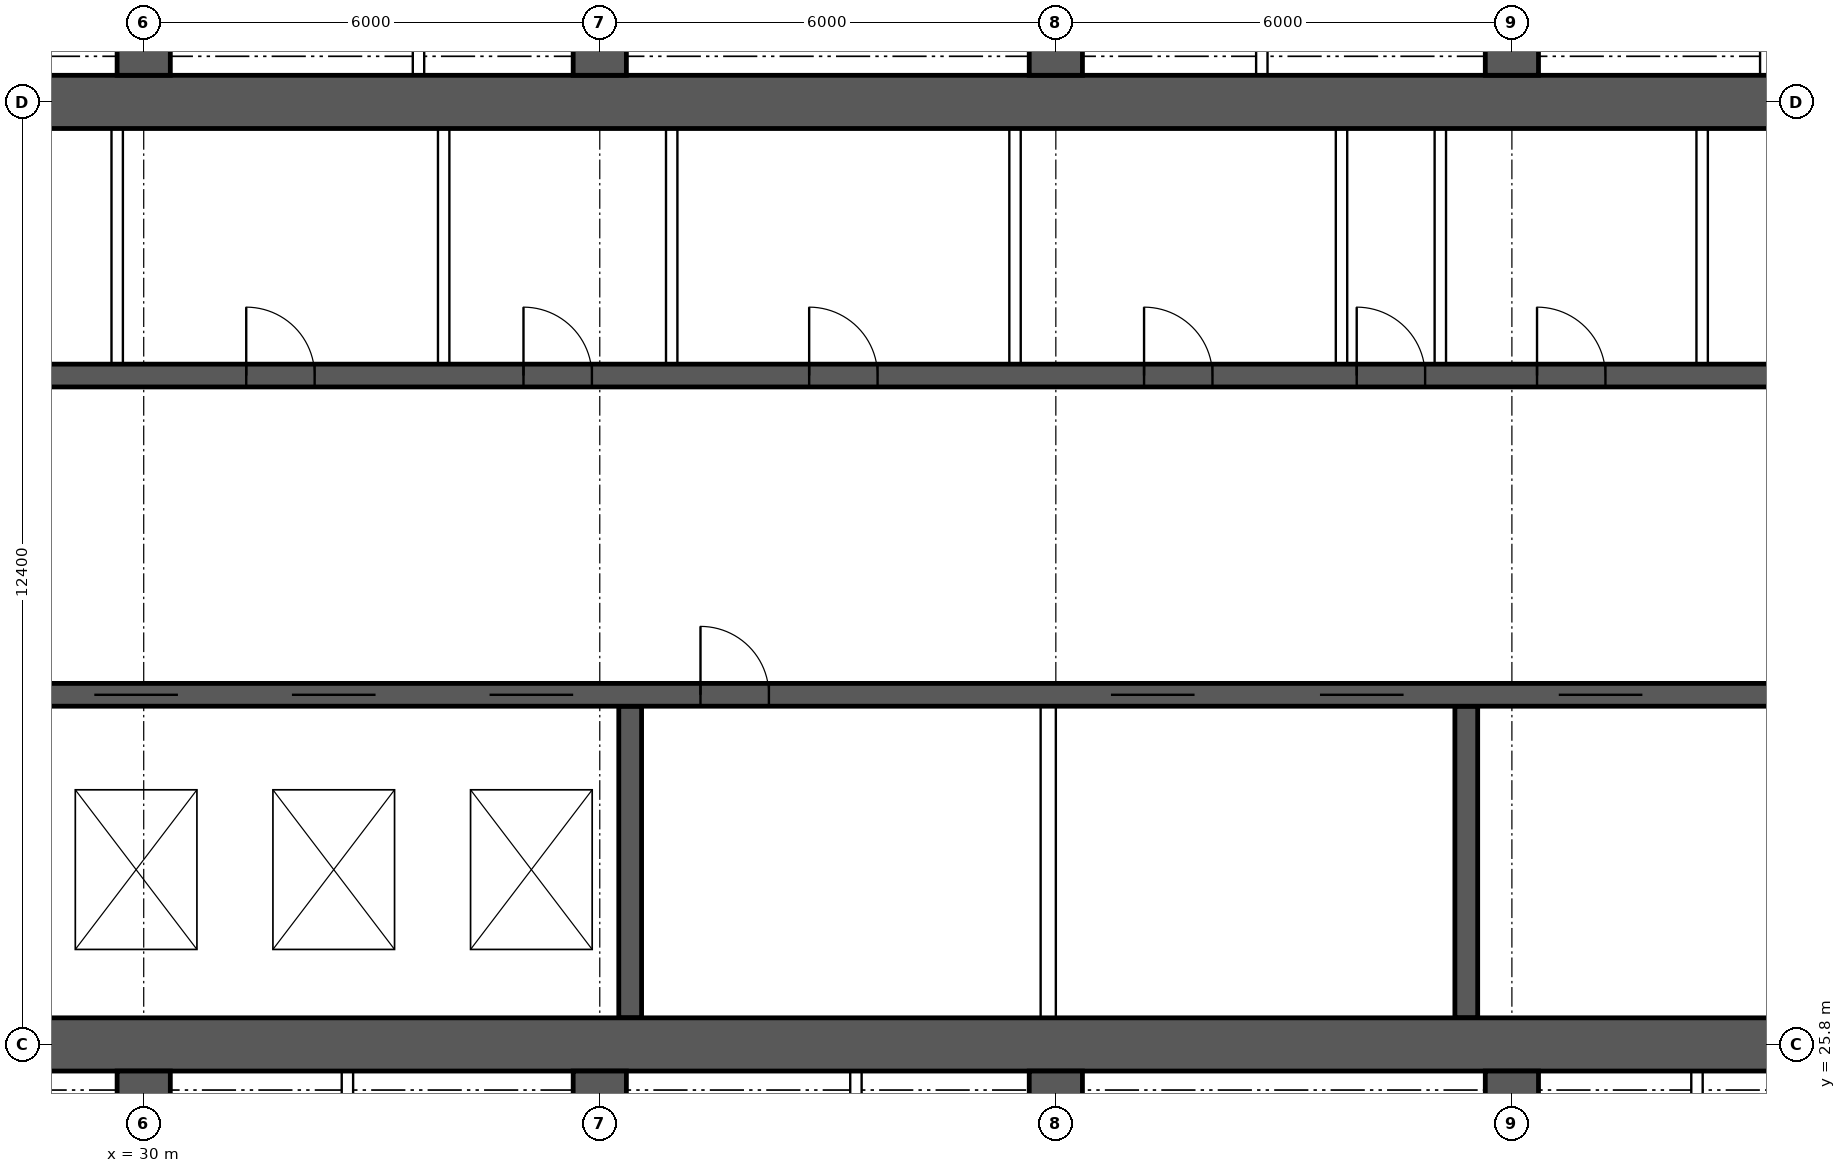
"""IFC4 building model, lengths in metres.
Left out: names, types, materials, properties, quantities, classifications, styles, units other than length and angle.
Written with IfcOpenShell. Run it as: python <this file> out.ifc"""

import sys

from ifc_helpers import new_model, si_unit, direction, frame, frame_2d, origin, place, context, subcontext, project, spatial, rectangle, extrude, element, fill, save


model = new_model("IFC4")
c1 = context("Model", 3, precision=1e-05, world=origin(), true_north=direction((0.0, 1.0)))
c2 = subcontext(c1, "Body", "Model", "MODEL_VIEW")
j1 = project(units=[si_unit("LENGTHUNIT", "METRE"), si_unit("PLANEANGLEUNIT", "RADIAN")], contexts=[c1])
p1 = place(None, origin())
s1 = spatial("IfcSite", under=j1, at=p1, CompositionType="ELEMENT")
p2 = place(p1, origin())
s2 = spatial("IfcBuilding", under=s1, at=p2, CompositionType="ELEMENT")
p3 = place(p2, frame((0.0, 0.0, 208.3)))
s3 = spatial("IfcBuildingStorey", under=s2, at=p3, CompositionType="ELEMENT", Elevation=208.3)
for number, where, z_axis, x_axis in (
    (1, (18.0, 25.8, 0.0), (0.0, 0.0, 1.0), (1.0, 0.0, 0.0)),
    (2, (18.0, 38.2, 0.0), (0.0, 0.0, 1.0), (1.0, 0.0, 0.0)),
):
    element("IfcWall", number, at=place(p3, frame(where, z_axis=z_axis, x_axis=x_axis)), inside=s3, PredefinedType="SHEAR", context=c2, shape_type="SweptSolid", body=[
        extrude(rectangle(XDim=48.0, YDim=0.7, at=frame_2d((24.0, 0.0))), origin(), (0.0, 0.0, 1.0), 4.5),
    ])
p4 = place(p3, frame((18.35, 30.4, 0.0), z_axis=(0.0, 0.0, 1.0), x_axis=(1.0, 0.0, 0.0)))
e3 = element("IfcWall", 3, at=p4, inside=s3, PredefinedType="SHEAR", context=c2, shape_type="SweptSolid", body=[
    extrude(rectangle(XDim=47.3, YDim=0.3, at=frame_2d((23.65, 0.0))), origin(), (0.0, 0.0, 1.0), 4.5),
])
p5 = place(p4, frame((0.4, 0.0, 0.0)))
e4 = element("IfcOpeningElement", 4, at=p5, cuts=e3, PredefinedType="OPENING", context=c2, shape_type="SweptSolid", body=[
    extrude(rectangle(XDim=1.0, YDim=2.1, at=frame_2d((0.5, 1.05))), frame((0.0, 0.16, 0.0), z_axis=(0.0, -1.0, 0.0), x_axis=(1.0, 0.0, 0.0)), (0.0, 0.0, 1.0), 0.32),
])
p6 = place(p4, frame((45.9, 0.0, 0.0)))
e5 = element("IfcOpeningElement", 5, at=p6, cuts=e3, PredefinedType="OPENING", context=c2, shape_type="SweptSolid", body=[
    extrude(rectangle(XDim=1.0, YDim=2.1, at=frame_2d((0.5, 1.05))), frame((0.0, 0.16, 0.0), z_axis=(0.0, -1.0, 0.0), x_axis=(1.0, 0.0, 0.0)), (0.0, 0.0, 1.0), 0.32),
])
p7 = place(p4, frame((8.4, 0.0, 0.0)))
e6 = element("IfcOpeningElement", 6, at=p7, cuts=e3, PredefinedType="OPENING", context=c2, shape_type="SweptSolid", body=[
    extrude(rectangle(XDim=1.1, YDim=2.1, at=frame_2d((0.55, 1.05))), frame((0.0, 0.16, 0.0), z_axis=(0.0, -1.0, 0.0), x_axis=(1.0, 0.0, 0.0)), (0.0, 0.0, 1.0), 0.32),
])
p8 = place(p4, frame((11.0, 0.0, 0.0)))
e7 = element("IfcOpeningElement", 7, at=p8, cuts=e3, PredefinedType="OPENING", context=c2, shape_type="SweptSolid", body=[
    extrude(rectangle(XDim=1.1, YDim=2.1, at=frame_2d((0.55, 1.05))), frame((0.0, 0.16, 0.0), z_axis=(0.0, -1.0, 0.0), x_axis=(1.0, 0.0, 0.0)), (0.0, 0.0, 1.0), 0.32),
])
p9 = place(p4, frame((13.6, 0.0, 0.0)))
e8 = element("IfcOpeningElement", 8, at=p9, cuts=e3, PredefinedType="OPENING", context=c2, shape_type="SweptSolid", body=[
    extrude(rectangle(XDim=1.1, YDim=2.1, at=frame_2d((0.55, 1.05))), frame((0.0, 0.16, 0.0), z_axis=(0.0, -1.0, 0.0), x_axis=(1.0, 0.0, 0.0)), (0.0, 0.0, 1.0), 0.32),
])
p10 = place(p4, frame((16.2, 0.0, 0.0)))
e9 = element("IfcOpeningElement", 9, at=p10, cuts=e3, PredefinedType="OPENING", context=c2, shape_type="SweptSolid", body=[
    extrude(rectangle(XDim=1.1, YDim=2.1, at=frame_2d((0.55, 1.05))), frame((0.0, 0.16, 0.0), z_axis=(0.0, -1.0, 0.0), x_axis=(1.0, 0.0, 0.0)), (0.0, 0.0, 1.0), 0.32),
])
p11 = place(p4, frame((18.975, 0.0, 0.0)))
e10 = element("IfcOpeningElement", 10, at=p11, cuts=e3, PredefinedType="OPENING", context=c2, shape_type="SweptSolid", body=[
    extrude(rectangle(XDim=0.9, YDim=2.1, at=frame_2d((0.45, 1.05))), frame((0.0, 0.16, 0.0), z_axis=(0.0, -1.0, 0.0), x_axis=(1.0, 0.0, 0.0)), (0.0, 0.0, 1.0), 0.32),
])
p12 = place(p4, frame((24.375, 0.0, 0.0)))
e11 = element("IfcOpeningElement", 11, at=p12, cuts=e3, PredefinedType="OPENING", context=c2, shape_type="SweptSolid", body=[
    extrude(rectangle(XDim=1.1, YDim=2.1, at=frame_2d((0.55, 1.05))), frame((0.0, 0.16, 0.0), z_axis=(0.0, -1.0, 0.0), x_axis=(1.0, 0.0, 0.0)), (0.0, 0.0, 1.0), 0.32),
])
p13 = place(p4, frame((27.125, 0.0, 0.0)))
e12 = element("IfcOpeningElement", 12, at=p13, cuts=e3, PredefinedType="OPENING", context=c2, shape_type="SweptSolid", body=[
    extrude(rectangle(XDim=1.1, YDim=2.1, at=frame_2d((0.55, 1.05))), frame((0.0, 0.16, 0.0), z_axis=(0.0, -1.0, 0.0), x_axis=(1.0, 0.0, 0.0)), (0.0, 0.0, 1.0), 0.32),
])
p14 = place(p4, frame((30.267, 0.0, 0.0)))
e13 = element("IfcOpeningElement", 13, at=p14, cuts=e3, PredefinedType="OPENING", context=c2, shape_type="SweptSolid", body=[
    extrude(rectangle(XDim=1.1, YDim=2.1, at=frame_2d((0.55, 1.05))), frame((0.0, 0.16, 0.0), z_axis=(0.0, -1.0, 0.0), x_axis=(1.0, 0.0, 0.0)), (0.0, 0.0, 1.0), 0.32),
])
p15 = place(p4, frame((33.8, 0.0, 0.0)))
e14 = element("IfcOpeningElement", 14, at=p15, cuts=e3, PredefinedType="OPENING", context=c2, shape_type="SweptSolid", body=[
    extrude(rectangle(XDim=1.1, YDim=2.1, at=frame_2d((0.55, 1.05))), frame((0.0, 0.16, 0.0), z_axis=(0.0, -1.0, 0.0), x_axis=(1.0, 0.0, 0.0)), (0.0, 0.0, 1.0), 0.32),
])
p16 = place(p4, frame((37.333, 0.0, 0.0)))
e15 = element("IfcOpeningElement", 15, at=p16, cuts=e3, PredefinedType="OPENING", context=c2, shape_type="SweptSolid", body=[
    extrude(rectangle(XDim=1.1, YDim=2.1, at=frame_2d((0.55, 1.05))), frame((0.0, 0.16, 0.0), z_axis=(0.0, -1.0, 0.0), x_axis=(1.0, 0.0, 0.0)), (0.0, 0.0, 1.0), 0.32),
])
p17 = place(p3, frame((18.35, 34.6, 0.0), z_axis=(0.0, 0.0, 1.0), x_axis=(1.0, 0.0, 0.0)))
e16 = element("IfcWall", 16, at=p17, inside=s3, PredefinedType="SHEAR", context=c2, shape_type="SweptSolid", body=[
    extrude(rectangle(XDim=47.3, YDim=0.3, at=frame_2d((23.65, 0.0))), origin(), (0.0, 0.0, 1.0), 4.5),
])
p18 = place(p17, frame((0.9, 0.0, 0.0)))
e17 = element("IfcOpeningElement", 17, at=p18, cuts=e16, PredefinedType="OPENING", context=c2, shape_type="SweptSolid", body=[
    extrude(rectangle(XDim=1.1, YDim=2.1, at=frame_2d((0.55, 1.05))), frame((0.0, 0.16, 0.0), z_axis=(0.0, -1.0, 0.0), x_axis=(1.0, 0.0, 0.0)), (0.0, 0.0, 1.0), 0.32),
])
p19 = place(p17, frame((45.3, 0.0, 0.0)))
e18 = element("IfcOpeningElement", 18, at=p19, cuts=e16, PredefinedType="OPENING", context=c2, shape_type="SweptSolid", body=[
    extrude(rectangle(XDim=1.1, YDim=2.1, at=frame_2d((0.55, 1.05))), frame((0.0, 0.16, 0.0), z_axis=(0.0, -1.0, 0.0), x_axis=(1.0, 0.0, 0.0)), (0.0, 0.0, 1.0), 0.32),
])
p20 = place(p17, frame((4.25, 0.0, 0.0)))
e19 = element("IfcOpeningElement", 19, at=p20, cuts=e16, PredefinedType="OPENING", context=c2, shape_type="SweptSolid", body=[
    extrude(rectangle(XDim=0.9, YDim=2.1, at=frame_2d((0.45, 1.05))), frame((0.0, 0.16, 0.0), z_axis=(0.0, -1.0, 0.0), x_axis=(1.0, 0.0, 0.0)), (0.0, 0.0, 1.0), 0.32),
])
p21 = place(p17, frame((42.15, 0.0, 0.0)))
e20 = element("IfcOpeningElement", 20, at=p21, cuts=e16, PredefinedType="OPENING", context=c2, shape_type="SweptSolid", body=[
    extrude(rectangle(XDim=0.9, YDim=2.1, at=frame_2d((0.45, 1.05))), frame((0.0, 0.16, 0.0), z_axis=(0.0, -1.0, 0.0), x_axis=(1.0, 0.0, 0.0)), (0.0, 0.0, 1.0), 0.32),
])
p22 = place(p17, frame((9.025, 0.0, 0.0)))
e21 = element("IfcOpeningElement", 21, at=p22, cuts=e16, PredefinedType="OPENING", context=c2, shape_type="SweptSolid", body=[
    extrude(rectangle(XDim=0.9, YDim=2.1, at=frame_2d((0.45, 1.05))), frame((0.0, 0.16, 0.0), z_axis=(0.0, -1.0, 0.0), x_axis=(1.0, 0.0, 0.0)), (0.0, 0.0, 1.0), 0.32),
])
p23 = place(p17, frame((12.999, 0.0, 0.0)))
e22 = element("IfcOpeningElement", 22, at=p23, cuts=e16, PredefinedType="OPENING", context=c2, shape_type="SweptSolid", body=[
    extrude(rectangle(XDim=0.9, YDim=2.1, at=frame_2d((0.45, 1.05))), frame((0.0, 0.16, 0.0), z_axis=(0.0, -1.0, 0.0), x_axis=(1.0, 0.0, 0.0)), (0.0, 0.0, 1.0), 0.32),
])
p24 = place(p17, frame((16.646, 0.0, 0.0)))
e23 = element("IfcOpeningElement", 23, at=p24, cuts=e16, PredefinedType="OPENING", context=c2, shape_type="SweptSolid", body=[
    extrude(rectangle(XDim=0.9, YDim=2.1, at=frame_2d((0.45, 1.05))), frame((0.0, 0.16, 0.0), z_axis=(0.0, -1.0, 0.0), x_axis=(1.0, 0.0, 0.0)), (0.0, 0.0, 1.0), 0.32),
])
p25 = place(p17, frame((20.405, 0.0, 0.0)))
e24 = element("IfcOpeningElement", 24, at=p25, cuts=e16, PredefinedType="OPENING", context=c2, shape_type="SweptSolid", body=[
    extrude(rectangle(XDim=0.9, YDim=2.1, at=frame_2d((0.45, 1.05))), frame((0.0, 0.16, 0.0), z_axis=(0.0, -1.0, 0.0), x_axis=(1.0, 0.0, 0.0)), (0.0, 0.0, 1.0), 0.32),
])
p26 = place(p17, frame((24.811, 0.0, 0.0)))
e25 = element("IfcOpeningElement", 25, at=p26, cuts=e16, PredefinedType="OPENING", context=c2, shape_type="SweptSolid", body=[
    extrude(rectangle(XDim=0.9, YDim=2.1, at=frame_2d((0.45, 1.05))), frame((0.0, 0.16, 0.0), z_axis=(0.0, -1.0, 0.0), x_axis=(1.0, 0.0, 0.0)), (0.0, 0.0, 1.0), 0.32),
])
p27 = place(p17, frame((27.608, 0.0, 0.0)))
e26 = element("IfcOpeningElement", 26, at=p27, cuts=e16, PredefinedType="OPENING", context=c2, shape_type="SweptSolid", body=[
    extrude(rectangle(XDim=0.9, YDim=2.1, at=frame_2d((0.45, 1.05))), frame((0.0, 0.16, 0.0), z_axis=(0.0, -1.0, 0.0), x_axis=(1.0, 0.0, 0.0)), (0.0, 0.0, 1.0), 0.32),
])
p28 = place(p17, frame((29.981, 0.0, 0.0)))
e27 = element("IfcOpeningElement", 27, at=p28, cuts=e16, PredefinedType="OPENING", context=c2, shape_type="SweptSolid", body=[
    extrude(rectangle(XDim=0.9, YDim=2.1, at=frame_2d((0.45, 1.05))), frame((0.0, 0.16, 0.0), z_axis=(0.0, -1.0, 0.0), x_axis=(1.0, 0.0, 0.0)), (0.0, 0.0, 1.0), 0.32),
])
p29 = place(p17, frame((35.451, 0.0, 0.0)))
e28 = element("IfcOpeningElement", 28, at=p29, cuts=e16, PredefinedType="OPENING", context=c2, shape_type="SweptSolid", body=[
    extrude(rectangle(XDim=0.9, YDim=2.1, at=frame_2d((0.45, 1.05))), frame((0.0, 0.16, 0.0), z_axis=(0.0, -1.0, 0.0), x_axis=(1.0, 0.0, 0.0)), (0.0, 0.0, 1.0), 0.32),
])
for number, where, z_axis, x_axis in (
    (29, (36.4, 26.15, 0.0), (0.0, 0.0, 1.0), (0.0, 1.0, 0.0)),
    (30, (47.4, 26.15, 0.0), (0.0, 0.0, 1.0), (0.0, 1.0, 0.0)),
):
    element("IfcWall", number, at=place(p3, frame(where, z_axis=z_axis, x_axis=x_axis)), inside=s3, PredefinedType="SHEAR", context=c2, shape_type="SweptSolid", body=[
        extrude(rectangle(XDim=4.1, YDim=0.3, at=frame_2d((2.05, 0.0))), origin(), (0.0, 0.0, 1.0), 4.5),
    ])
for number, where, z_axis, x_axis in (
    (31, (30.0, 18.4, 0.0), (0.0, 0.0, 1.0), (0.0, 1.0, 0.0)),
    (32, (30.0, 38.55, 0.0), (0.0, 0.0, 1.0), (0.0, 1.0, 0.0)),
    (33, (36.0, 18.4, 0.0), (0.0, 0.0, 1.0), (0.0, 1.0, 0.0)),
    (34, (36.0, 38.55, 0.0), (0.0, 0.0, 1.0), (0.0, 1.0, 0.0)),
    (35, (42.0, 18.4, 0.0), (0.0, 0.0, 1.0), (0.0, 1.0, 0.0)),
    (36, (42.0, 38.55, 0.0), (0.0, 0.0, 1.0), (0.0, 1.0, 0.0)),
    (37, (48.0, 18.4, 0.0), (0.0, 0.0, 1.0), (0.0, 1.0, 0.0)),
    (38, (48.0, 38.55, 0.0), (0.0, 0.0, 1.0), (0.0, 1.0, 0.0)),
):
    element("IfcWall", number, at=place(p3, frame(where, z_axis=z_axis, x_axis=x_axis)), inside=s3, PredefinedType="SHEAR", context=c2, shape_type="SweptSolid", body=[
        extrude(rectangle(XDim=7.05, YDim=0.7, at=frame_2d((3.525, 0.0))), origin(), (0.0, 0.0, 1.0), 4.5),
    ])
for number, where, z_axis, x_axis in (
    (39, (29.651, 34.75, 0.0), (0.0, 0.0, 1.0), (0.0, 1.0, 0.0)),
    (40, (33.946, 34.75, 0.0), (0.0, 0.0, 1.0), (0.0, 1.0, 0.0)),
    (41, (36.946, 34.75, 0.0), (0.0, 0.0, 1.0), (0.0, 1.0, 0.0)),
    (42, (41.463, 34.75, 0.0), (0.0, 0.0, 1.0), (0.0, 1.0, 0.0)),
    (43, (45.758, 34.75, 0.0), (0.0, 0.0, 1.0), (0.0, 1.0, 0.0)),
    (44, (47.058, 34.75, 0.0), (0.0, 0.0, 1.0), (0.0, 1.0, 0.0)),
    (45, (50.503, 34.75, 0.0), (0.0, 0.0, 1.0), (0.0, 1.0, 0.0)),
):
    element("IfcWall", number, at=place(p3, frame(where, z_axis=z_axis, x_axis=x_axis)), inside=s3, PredefinedType="SOLIDWALL", context=c2, shape_type="SweptSolid", body=[
        extrude(rectangle(XDim=3.1, YDim=0.15, at=frame_2d((1.55, 0.0))), origin(), (0.0, 0.0, 1.0), 4.25),
    ])
p30 = place(p3, frame((41.9, 26.15, 0.0), z_axis=(0.0, 0.0, 1.0), x_axis=(0.0, 1.0, 0.0)))
e46 = element("IfcWall", 46, at=p30, inside=s3, PredefinedType="SOLIDWALL", context=c2, shape_type="SweptSolid", body=[
    extrude(rectangle(XDim=4.1, YDim=0.2, at=frame_2d((2.05, 0.0))), origin(), (0.0, 0.0, 1.0), 4.25),
])
for number, where, z_axis, x_axis in (
    (47, (32.68, 18.5, 0.0), (0.0, 0.0, 1.0), (0.0, 1.0, 0.0)),
    (48, (39.37, 18.5, 0.0), (0.0, 0.0, 1.0), (0.0, 1.0, 0.0)),
    (49, (50.435, 18.5, 0.0), (0.0, 0.0, 1.0), (0.0, 1.0, 0.0)),
    (50, (33.615, 38.55, 0.0), (0.0, 0.0, 1.0), (0.0, 1.0, 0.0)),
    (51, (44.71, 38.55, 0.0), (0.0, 0.0, 1.0), (0.0, 1.0, 0.0)),
    (52, (51.34, 38.55, 0.0), (0.0, 0.0, 1.0), (0.0, 1.0, 0.0)),
):
    element("IfcWall", number, at=place(p3, frame(where, z_axis=z_axis, x_axis=x_axis)), inside=s3, PredefinedType="PARTITIONING", context=c2, shape_type="SweptSolid", body=[
        extrude(rectangle(XDim=6.95, YDim=0.15, at=frame_2d((3.475, 0.0))), origin(), (0.0, 0.0, 1.0), 4.25),
    ])
p31 = place(p23, origin())
e53 = element("IfcDoor", 53, at=p31, inside=s3, OperationType="SINGLE_SWING_LEFT", PredefinedType="DOOR", context=c2, shape_type="SweptSolid", body=[
    extrude(rectangle(XDim=0.9, YDim=2.1, at=frame_2d((0.45, 1.05))), frame((0.0, 0.025, 0.0), z_axis=(0.0, -1.0, 0.0), x_axis=(1.0, 0.0, 0.0)), (0.0, 0.0, 1.0), 0.05),
])
fill(e22, e53)
p32 = place(p24, origin())
e54 = element("IfcDoor", 54, at=p32, inside=s3, OperationType="SINGLE_SWING_LEFT", PredefinedType="DOOR", context=c2, shape_type="SweptSolid", body=[
    extrude(rectangle(XDim=0.9, YDim=2.1, at=frame_2d((0.45, 1.05))), frame((0.0, 0.025, 0.0), z_axis=(0.0, -1.0, 0.0), x_axis=(1.0, 0.0, 0.0)), (0.0, 0.0, 1.0), 0.05),
])
fill(e23, e54)
p33 = place(p25, origin())
e55 = element("IfcDoor", 55, at=p33, inside=s3, OperationType="SINGLE_SWING_LEFT", PredefinedType="DOOR", context=c2, shape_type="SweptSolid", body=[
    extrude(rectangle(XDim=0.9, YDim=2.1, at=frame_2d((0.45, 1.05))), frame((0.0, 0.025, 0.0), z_axis=(0.0, -1.0, 0.0), x_axis=(1.0, 0.0, 0.0)), (0.0, 0.0, 1.0), 0.05),
])
fill(e24, e55)
p34 = place(p26, origin())
e56 = element("IfcDoor", 56, at=p34, inside=s3, OperationType="SINGLE_SWING_LEFT", PredefinedType="DOOR", context=c2, shape_type="SweptSolid", body=[
    extrude(rectangle(XDim=0.9, YDim=2.1, at=frame_2d((0.45, 1.05))), frame((0.0, 0.025, 0.0), z_axis=(0.0, -1.0, 0.0), x_axis=(1.0, 0.0, 0.0)), (0.0, 0.0, 1.0), 0.05),
])
fill(e25, e56)
p35 = place(p27, origin())
e57 = element("IfcDoor", 57, at=p35, inside=s3, OperationType="SINGLE_SWING_LEFT", PredefinedType="DOOR", context=c2, shape_type="SweptSolid", body=[
    extrude(rectangle(XDim=0.9, YDim=2.1, at=frame_2d((0.45, 1.05))), frame((0.0, 0.025, 0.0), z_axis=(0.0, -1.0, 0.0), x_axis=(1.0, 0.0, 0.0)), (0.0, 0.0, 1.0), 0.05),
])
fill(e26, e57)
p36 = place(p28, origin())
e58 = element("IfcDoor", 58, at=p36, inside=s3, OperationType="SINGLE_SWING_LEFT", PredefinedType="DOOR", context=c2, shape_type="SweptSolid", body=[
    extrude(rectangle(XDim=0.9, YDim=2.1, at=frame_2d((0.45, 1.05))), frame((0.0, 0.025, 0.0), z_axis=(0.0, -1.0, 0.0), x_axis=(1.0, 0.0, 0.0)), (0.0, 0.0, 1.0), 0.05),
])
fill(e27, e58)
p37 = place(p8, origin())
e59 = element("IfcDoor", 59, at=p37, inside=s3, OperationType="DOUBLE_DOOR_SLIDING", PredefinedType="DOOR", context=c2, shape_type="SweptSolid", body=[
    extrude(rectangle(XDim=1.1, YDim=2.1, at=frame_2d((0.55, 1.05))), frame((0.0, 0.025, 0.0), z_axis=(0.0, -1.0, 0.0), x_axis=(1.0, 0.0, 0.0)), (0.0, 0.0, 1.0), 0.05),
])
fill(e7, e59)
p38 = place(p9, origin())
e60 = element("IfcDoor", 60, at=p38, inside=s3, OperationType="DOUBLE_DOOR_SLIDING", PredefinedType="DOOR", context=c2, shape_type="SweptSolid", body=[
    extrude(rectangle(XDim=1.1, YDim=2.1, at=frame_2d((0.55, 1.05))), frame((0.0, 0.025, 0.0), z_axis=(0.0, -1.0, 0.0), x_axis=(1.0, 0.0, 0.0)), (0.0, 0.0, 1.0), 0.05),
])
fill(e8, e60)
p39 = place(p10, origin())
e61 = element("IfcDoor", 61, at=p39, inside=s3, OperationType="DOUBLE_DOOR_SLIDING", PredefinedType="DOOR", context=c2, shape_type="SweptSolid", body=[
    extrude(rectangle(XDim=1.1, YDim=2.1, at=frame_2d((0.55, 1.05))), frame((0.0, 0.025, 0.0), z_axis=(0.0, -1.0, 0.0), x_axis=(1.0, 0.0, 0.0)), (0.0, 0.0, 1.0), 0.05),
])
fill(e9, e61)
p40 = place(p11, origin())
e62 = element("IfcDoor", 62, at=p40, inside=s3, OperationType="SINGLE_SWING_LEFT", PredefinedType="DOOR", context=c2, shape_type="SweptSolid", body=[
    extrude(rectangle(XDim=0.9, YDim=2.1, at=frame_2d((0.45, 1.05))), frame((0.0, 0.025, 0.0), z_axis=(0.0, -1.0, 0.0), x_axis=(1.0, 0.0, 0.0)), (0.0, 0.0, 1.0), 0.05),
])
fill(e10, e62)
p41 = place(p12, origin())
e63 = element("IfcDoor", 63, at=p41, inside=s3, OperationType="DOUBLE_DOOR_SLIDING", PredefinedType="DOOR", context=c2, shape_type="SweptSolid", body=[
    extrude(rectangle(XDim=1.1, YDim=2.1, at=frame_2d((0.55, 1.05))), frame((0.0, 0.025, 0.0), z_axis=(0.0, -1.0, 0.0), x_axis=(1.0, 0.0, 0.0)), (0.0, 0.0, 1.0), 0.05),
])
fill(e11, e63)
p42 = place(p13, origin())
e64 = element("IfcDoor", 64, at=p42, inside=s3, OperationType="DOUBLE_DOOR_SLIDING", PredefinedType="DOOR", context=c2, shape_type="SweptSolid", body=[
    extrude(rectangle(XDim=1.1, YDim=2.1, at=frame_2d((0.55, 1.05))), frame((0.0, 0.025, 0.0), z_axis=(0.0, -1.0, 0.0), x_axis=(1.0, 0.0, 0.0)), (0.0, 0.0, 1.0), 0.05),
])
fill(e12, e64)
p43 = place(p14, origin())
e65 = element("IfcDoor", 65, at=p43, inside=s3, OperationType="DOUBLE_DOOR_SLIDING", PredefinedType="DOOR", context=c2, shape_type="SweptSolid", body=[
    extrude(rectangle(XDim=1.1, YDim=2.1, at=frame_2d((0.55, 1.05))), frame((0.0, 0.025, 0.0), z_axis=(0.0, -1.0, 0.0), x_axis=(1.0, 0.0, 0.0)), (0.0, 0.0, 1.0), 0.05),
])
fill(e13, e65)
save(model, sys.argv[1])
